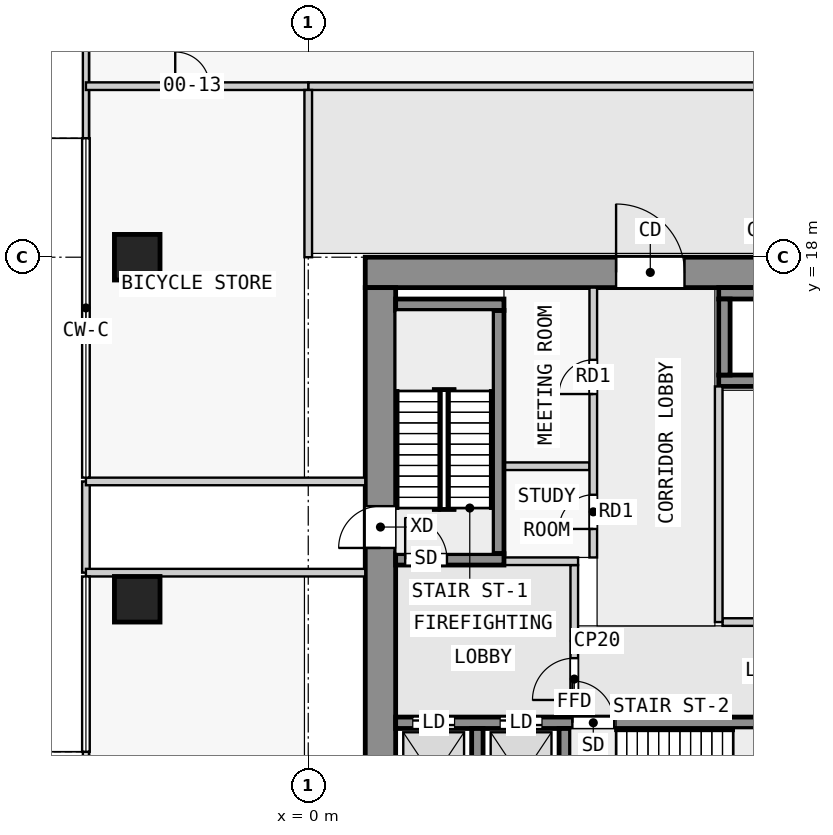
"""IFC4 building model, lengths in metres.
Left out: names, types, materials, properties, quantities, classifications, styles, units other than length and angle.
Written with IfcOpenShell. Run it as: python <this file> out.ifc"""

import sys

from ifc_helpers import new_model, si_unit, direction, frame, frame_2d, origin, origin_2d, place, context, subcontext, project, spatial, rectangle, extrude, element, fill, save


model = new_model("IFC4")
c1 = context("Model", 3, precision=1e-05, world=origin(), true_north=direction((0.0, 1.0)))
c2 = subcontext(c1, "Body", "Model", "MODEL_VIEW")
j1 = project(units=[si_unit("LENGTHUNIT", "METRE"), si_unit("PLANEANGLEUNIT", "RADIAN")], contexts=[c1])
p1 = place(None, origin())
s1 = spatial("IfcSite", under=j1, at=p1, CompositionType="ELEMENT")
p2 = place(p1, origin())
s2 = spatial("IfcBuilding", under=s1, at=p2, CompositionType="ELEMENT")
p3 = place(p2, origin())
s3 = spatial("IfcBuildingStorey", under=s2, at=p3, CompositionType="ELEMENT", Elevation=0.0)
for number, where, z_axis, x_axis in (
    (1, (-4.5, 9.0, 0.0), (0.0, 0.0, 1.0), (1.0, 0.0, 0.0)),
    (2, (-4.5, 18.0, 0.0), (0.0, 0.0, 1.0), (1.0, 0.0, 0.0)),
):
    element("IfcColumn", number, at=place(p3, frame(where, z_axis=z_axis, x_axis=x_axis)), inside=s3, PredefinedType="COLUMN", context=c2, shape_type="SweptSolid", body=[
        extrude(rectangle(XDim=1.2, YDim=1.2, at=origin_2d()), origin(), (0.0, 0.0, 1.0), 8.0),
    ])
p4 = place(p3, frame((1.5, 17.6, 0.0), z_axis=(0.0, 0.0, 1.0), x_axis=(1.0, 0.0, 0.0)))
e3 = element("IfcWall", 3, at=p4, inside=s3, PredefinedType="SHEAR", context=c2, shape_type="SweptSolid", body=[
    extrude(rectangle(XDim=21.0, YDim=0.8, at=frame_2d((10.5, 0.0))), origin(), (0.0, 0.0, 1.0), 7.65),
])
p5 = place(p4, frame((6.6, 0.0, 0.0)))
e4 = element("IfcOpeningElement", 4, at=p5, cuts=e3, PredefinedType="OPENING", context=c2, shape_type="SweptSolid", body=[
    extrude(rectangle(XDim=1.8, YDim=2.1, at=frame_2d((0.9, 1.05))), frame((0.0, 0.41, 0.0), z_axis=(0.0, -1.0, 0.0), x_axis=(1.0, 0.0, 0.0)), (0.0, 0.0, 1.0), 0.82),
])
p6 = place(p3, frame((1.9, 2.5, 0.0), z_axis=(0.0, 0.0, 1.0), x_axis=(0.0, 1.0, 0.0)))
e5 = element("IfcWall", 5, at=p6, inside=s3, PredefinedType="SHEAR", context=c2, shape_type="SweptSolid", body=[
    extrude(rectangle(XDim=14.7, YDim=0.8, at=frame_2d((7.35, 0.0))), origin(), (0.0, 0.0, 1.0), 7.65),
])
p7 = place(p6, frame((7.85, 0.0, 0.0)))
e6 = element("IfcOpeningElement", 6, at=p7, cuts=e5, PredefinedType="OPENING", context=c2, shape_type="SweptSolid", body=[
    extrude(rectangle(XDim=1.1, YDim=2.1, at=frame_2d((0.55, 1.05))), frame((0.0, 0.41, 0.0), z_axis=(0.0, -1.0, 0.0), x_axis=(1.0, 0.0, 0.0)), (0.0, 0.0, 1.0), 0.82),
])
for number, where, z_axis, x_axis in (
    (7, (4.45, 2.8, 0.0), (0.0, 0.0, 1.0), (0.0, 1.0, 0.0)),
    (8, (6.75, 2.8, 0.0), (0.0, 0.0, 1.0), (0.0, 1.0, 0.0)),
):
    element("IfcWall", number, at=place(p3, frame(where, z_axis=z_axis, x_axis=x_axis)), inside=s3, PredefinedType="SHEAR", context=c2, shape_type="SweptSolid", body=[
        extrude(rectangle(XDim=2.8, YDim=0.3, at=frame_2d((1.4, 0.0))), origin(), (0.0, 0.0, 1.0), 7.65),
    ])
p8 = place(p3, frame((2.3, 5.75, 0.0), z_axis=(0.0, 0.0, 1.0), x_axis=(1.0, 0.0, 0.0)))
e9 = element("IfcWall", 9, at=p8, inside=s3, PredefinedType="SHEAR", context=c2, shape_type="SweptSolid", body=[
    extrude(rectangle(XDim=18.8, YDim=0.3, at=frame_2d((9.4, 0.0))), origin(), (0.0, 0.0, 1.0), 7.65),
])
p9 = place(p8, frame((4.65, 0.0, 0.0)))
e10 = element("IfcOpeningElement", 10, at=p9, cuts=e9, PredefinedType="OPENING", context=c2, shape_type="SweptSolid", body=[
    extrude(rectangle(XDim=1.1, YDim=2.1, at=frame_2d((0.55, 1.05))), frame((0.0, 0.16, 0.0), z_axis=(0.0, -1.0, 0.0), x_axis=(1.0, 0.0, 0.0)), (0.0, 0.0, 1.0), 0.32),
])
p10 = place(p8, frame((0.45, 0.0, 0.0)))
e11 = element("IfcOpeningElement", 11, at=p10, cuts=e9, PredefinedType="OPENING", context=c2, shape_type="SweptSolid", body=[
    extrude(rectangle(XDim=1.1, YDim=2.1, at=frame_2d((0.55, 1.05))), frame((0.0, 0.16, 0.0), z_axis=(0.0, -1.0, 0.0), x_axis=(1.0, 0.0, 0.0)), (0.0, 0.0, 1.0), 0.32),
])
p11 = place(p8, frame((2.75, 0.0, 0.0)))
e12 = element("IfcOpeningElement", 12, at=p11, cuts=e9, PredefinedType="OPENING", context=c2, shape_type="SweptSolid", body=[
    extrude(rectangle(XDim=1.1, YDim=2.1, at=frame_2d((0.55, 1.05))), frame((0.0, 0.16, 0.0), z_axis=(0.0, -1.0, 0.0), x_axis=(1.0, 0.0, 0.0)), (0.0, 0.0, 1.0), 0.32),
])
p12 = place(p8, frame((11.85, 0.0, 0.0)))
e13 = element("IfcOpeningElement", 13, at=p12, cuts=e9, PredefinedType="OPENING", context=c2, shape_type="SweptSolid", body=[
    extrude(rectangle(XDim=1.1, YDim=2.1, at=frame_2d((0.55, 1.05))), frame((0.0, 0.16, 0.0), z_axis=(0.0, -1.0, 0.0), x_axis=(1.0, 0.0, 0.0)), (0.0, 0.0, 1.0), 0.32),
])
p13 = place(p8, frame((14.35, 0.0, 0.0)))
e14 = element("IfcOpeningElement", 14, at=p13, cuts=e9, PredefinedType="OPENING", context=c2, shape_type="SweptSolid", body=[
    extrude(rectangle(XDim=1.1, YDim=2.1, at=frame_2d((0.55, 1.05))), frame((0.0, 0.16, 0.0), z_axis=(0.0, -1.0, 0.0), x_axis=(1.0, 0.0, 0.0)), (0.0, 0.0, 1.0), 0.32),
])
p14 = place(p8, frame((16.85, 0.0, 0.0)))
e15 = element("IfcOpeningElement", 15, at=p14, cuts=e9, PredefinedType="OPENING", context=c2, shape_type="SweptSolid", body=[
    extrude(rectangle(XDim=1.1, YDim=2.1, at=frame_2d((0.55, 1.05))), frame((0.0, 0.16, 0.0), z_axis=(0.0, -1.0, 0.0), x_axis=(1.0, 0.0, 0.0)), (0.0, 0.0, 1.0), 0.32),
])
p15 = place(p3, frame((2.3, 10.05, 0.0), z_axis=(0.0, 0.0, 1.0), x_axis=(1.0, 0.0, 0.0)))
e16 = element("IfcWall", 16, at=p15, inside=s3, PredefinedType="SHEAR", context=c2, shape_type="SweptSolid", body=[
    extrude(rectangle(XDim=2.85, YDim=0.3, at=frame_2d((1.425, 0.0))), origin(), (0.0, 0.0, 1.0), 7.65),
])
p16 = place(p15, frame((0.25, 0.0, 0.0)))
e17 = element("IfcOpeningElement", 17, at=p16, cuts=e16, PredefinedType="OPENING", context=c2, shape_type="SweptSolid", body=[
    extrude(rectangle(XDim=1.1, YDim=2.1, at=frame_2d((0.55, 1.05))), frame((0.0, 0.16, 0.0), z_axis=(0.0, -1.0, 0.0), x_axis=(1.0, 0.0, 0.0)), (0.0, 0.0, 1.0), 0.32),
])
p17 = place(p3, frame((5.0, 10.2, 0.0), z_axis=(0.0, 0.0, 1.0), x_axis=(0.0, 1.0, 0.0)))
e18 = element("IfcWall", 18, at=p17, inside=s3, PredefinedType="SHEAR", context=c2, shape_type="SweptSolid", body=[
    extrude(rectangle(XDim=6.4, YDim=0.3, at=frame_2d((3.2, 0.0))), origin(), (0.0, 0.0, 1.0), 7.65),
])
p18 = place(p3, frame((2.3, 16.75, 0.0), z_axis=(0.0, 0.0, 1.0), x_axis=(1.0, 0.0, 0.0)))
e19 = element("IfcWall", 19, at=p18, inside=s3, PredefinedType="SHEAR", context=c2, shape_type="SweptSolid", body=[
    extrude(rectangle(XDim=2.85, YDim=0.3, at=frame_2d((1.425, 0.0))), origin(), (0.0, 0.0, 1.0), 7.65),
])
for number, where, z_axis, x_axis in (
    (20, (10.8, 17.05, 0.0), (0.0, 0.0, 1.0), (1.0, 0.0, 0.0)),
    (21, (10.8, 14.75, 0.0), (0.0, 0.0, 1.0), (1.0, 0.0, 0.0)),
):
    element("IfcWall", number, at=place(p3, frame(where, z_axis=z_axis, x_axis=x_axis)), inside=s3, PredefinedType="SHEAR", context=c2, shape_type="SweptSolid", body=[
        extrude(rectangle(XDim=7.8, YDim=0.3, at=frame_2d((3.9, 0.0))), origin(), (0.0, 0.0, 1.0), 7.65),
    ])
p19 = place(p3, frame((10.95, 14.9, 0.0), z_axis=(0.0, 0.0, 1.0), x_axis=(0.0, 1.0, 0.0)))
e22 = element("IfcWall", 22, at=p19, inside=s3, PredefinedType="SHEAR", context=c2, shape_type="SweptSolid", body=[
    extrude(rectangle(XDim=2.0, YDim=0.3, at=frame_2d((1.0, 0.0))), origin(), (0.0, 0.0, 1.0), 7.65),
])
p20 = place(p3, frame((-5.85, 21.13, 0.0), z_axis=(0.0, 0.0, 1.0), x_axis=(0.0, 1.0, 0.0)))
e23 = element("IfcWall", 23, at=p20, inside=s3, PredefinedType="STANDARD", context=c2, shape_type="SweptSolid", body=[
    extrude(rectangle(XDim=13.395, YDim=0.16, at=frame_2d((6.698, 0.0))), origin(), (0.0, 0.0, 1.0), 7.65),
])
p21 = place(p20, frame((6.948, 0.0, 0.0)))
e24 = element("IfcOpeningElement", 24, at=p21, cuts=e23, PredefinedType="OPENING", context=c2, shape_type="SweptSolid", body=[
    extrude(rectangle(XDim=3.0, YDim=3.0, at=frame_2d((1.5, 1.5))), frame((0.0, 0.09, 0.0), z_axis=(0.0, -1.0, 0.0), x_axis=(1.0, 0.0, 0.0)), (0.0, 0.0, 1.0), 0.18),
])
p22 = place(p20, frame((9.948, 0.0, 0.0)))
e25 = element("IfcOpeningElement", 25, at=p22, cuts=e23, PredefinedType="OPENING", context=c2, shape_type="SweptSolid", body=[
    extrude(rectangle(XDim=3.0, YDim=3.0, at=frame_2d((1.5, 1.5))), frame((0.0, 0.09, 0.0), z_axis=(0.0, -1.0, 0.0), x_axis=(1.0, 0.0, 0.0)), (0.0, 0.0, 1.0), 0.18),
])
p23 = place(p20, frame((3.67, 0.0, 0.0)))
e26 = element("IfcOpeningElement", 26, at=p23, cuts=e23, PredefinedType="OPENING", context=c2, shape_type="SweptSolid", body=[
    extrude(rectangle(XDim=1.2, YDim=2.4, at=frame_2d((0.6, 1.2))), frame((0.0, 0.09, 0.0), z_axis=(0.0, -1.0, 0.0), x_axis=(1.0, 0.0, 0.0)), (0.0, 0.0, 1.0), 0.18),
])
p24 = place(p3, frame((-5.85, 0.375, 0.0), z_axis=(0.0, 0.0, 1.0), x_axis=(0.0, 1.0, 0.0)))
e27 = element("IfcWall", 27, at=p24, inside=s3, PredefinedType="STANDARD", context=c2, shape_type="SweptSolid", body=[
    extrude(rectangle(XDim=4.613, YDim=0.16, at=frame_2d((2.306, 0.0))), origin(), (0.0, 0.0, 1.0), 7.65),
])
p25 = place(p24, frame((1.706, 0.0, 0.0)))
e28 = element("IfcOpeningElement", 28, at=p25, cuts=e27, PredefinedType="OPENING", context=c2, shape_type="SweptSolid", body=[
    extrude(rectangle(XDim=1.2, YDim=2.4, at=frame_2d((0.6, 1.2))), frame((0.0, 0.09, 0.0), z_axis=(0.0, -1.0, 0.0), x_axis=(1.0, 0.0, 0.0)), (0.0, 0.0, 1.0), 0.18),
])
p26 = place(p3, frame((7.0, 5.9, 0.0), z_axis=(0.0, 0.0, 1.0), x_axis=(0.0, 1.0, 0.0)))
e29 = element("IfcWall", 29, at=p26, inside=s3, PredefinedType="PARTITIONING", context=c2, shape_type="SweptSolid", body=[
    extrude(rectangle(XDim=4.0, YDim=0.2, at=frame_2d((2.0, 0.0))), origin(), (0.0, 0.0, 1.0), 7.65),
])
p27 = place(p26, frame((0.45, 0.0, 0.0)))
e30 = element("IfcOpeningElement", 30, at=p27, cuts=e29, PredefinedType="OPENING", context=c2, shape_type="SweptSolid", body=[
    extrude(rectangle(XDim=1.1, YDim=2.1, at=frame_2d((0.55, 1.05))), frame((0.0, 0.11, 0.0), z_axis=(0.0, -1.0, 0.0), x_axis=(1.0, 0.0, 0.0)), (0.0, 0.0, 1.0), 0.22),
])
p28 = place(p3, frame((5.15, 10.0, 0.0), z_axis=(0.0, 0.0, 1.0), x_axis=(1.0, 0.0, 0.0)))
e31 = element("IfcWall", 31, at=p28, inside=s3, PredefinedType="PARTITIONING", context=c2, shape_type="SweptSolid", body=[
    extrude(rectangle(XDim=1.95, YDim=0.2, at=frame_2d((0.975, 0.0))), origin(), (0.0, 0.0, 1.0), 7.65),
])
p29 = place(p3, frame((10.8, 8.4, 0.0), z_axis=(0.0, 0.0, 1.0), x_axis=(0.0, 1.0, 0.0)))
e32 = element("IfcWall", 32, at=p29, inside=s3, PredefinedType="PARTITIONING", context=c2, shape_type="SweptSolid", body=[
    extrude(rectangle(XDim=6.2, YDim=0.2, at=frame_2d((3.1, 0.0))), origin(), (0.0, 0.0, 1.0), 7.65),
])
p30 = place(p3, frame((10.9, 8.4, 0.0), z_axis=(0.0, 0.0, 1.0), x_axis=(1.0, 0.0, 0.0)))
e33 = element("IfcWall", 33, at=p30, inside=s3, PredefinedType="PARTITIONING", context=c2, shape_type="SweptSolid", body=[
    extrude(rectangle(XDim=7.4, YDim=0.2, at=frame_2d((3.7, 0.0))), origin(), (0.0, 0.0, 1.0), 7.65),
])
p31 = place(p3, frame((7.5, 10.1, 0.0), z_axis=(0.0, 0.0, 1.0), x_axis=(0.0, 1.0, 0.0)))
e34 = element("IfcWall", 34, at=p31, inside=s3, PredefinedType="PARTITIONING", context=c2, shape_type="SweptSolid", body=[
    extrude(rectangle(XDim=7.1, YDim=0.2, at=frame_2d((3.55, 0.0))), origin(), (0.0, 0.0, 1.0), 7.65),
])
p32 = place(p31, frame((0.75, 0.0, 0.0)))
e35 = element("IfcOpeningElement", 35, at=p32, cuts=e34, PredefinedType="OPENING", context=c2, shape_type="SweptSolid", body=[
    extrude(rectangle(XDim=0.9, YDim=2.1, at=frame_2d((0.45, 1.05))), frame((0.0, 0.11, 0.0), z_axis=(0.0, -1.0, 0.0), x_axis=(1.0, 0.0, 0.0)), (0.0, 0.0, 1.0), 0.22),
])
p33 = place(p31, frame((4.3, 0.0, 0.0)))
e36 = element("IfcOpeningElement", 36, at=p33, cuts=e34, PredefinedType="OPENING", context=c2, shape_type="SweptSolid", body=[
    extrude(rectangle(XDim=0.9, YDim=2.1, at=frame_2d((0.45, 1.05))), frame((0.0, 0.11, 0.0), z_axis=(0.0, -1.0, 0.0), x_axis=(1.0, 0.0, 0.0)), (0.0, 0.0, 1.0), 0.22),
])
p34 = place(p3, frame((5.15, 12.5, 0.0), z_axis=(0.0, 0.0, 1.0), x_axis=(1.0, 0.0, 0.0)))
e37 = element("IfcWall", 37, at=p34, inside=s3, PredefinedType="PARTITIONING", context=c2, shape_type="SweptSolid", body=[
    extrude(rectangle(XDim=2.25, YDim=0.2, at=frame_2d((1.125, 0.0))), origin(), (0.0, 0.0, 1.0), 7.65),
])
for number, where, z_axis, x_axis in (
    (38, (-5.85, 9.7, 0.0), (0.0, 0.0, 1.0), (1.0, 0.0, 0.0)),
    (39, (-5.85, 12.1, 0.0), (0.0, 0.0, 1.0), (1.0, 0.0, 0.0)),
):
    element("IfcWall", number, at=place(p3, frame(where, z_axis=z_axis, x_axis=x_axis)), inside=s3, PredefinedType="PARTITIONING", context=c2, shape_type="SweptSolid", body=[
        extrude(rectangle(XDim=7.35, YDim=0.2, at=frame_2d((3.675, 0.0))), origin(), (0.0, 0.0, 1.0), 7.65),
    ])
p35 = place(p3, frame((-5.85, 9.7, 0.0), z_axis=(0.0, 0.0, 1.0), x_axis=(0.0, 1.0, 0.0)))
e40 = element("IfcWall", 40, at=p35, inside=s3, PredefinedType="PARTITIONING", context=c2, shape_type="SweptSolid", body=[
    extrude(rectangle(XDim=2.4, YDim=0.2, at=frame_2d((1.2, 0.0))), origin(), (0.0, 0.0, 1.0), 7.65),
])
p36 = place(p3, frame((45.0, 22.5, 0.0), z_axis=(0.0, 0.0, 1.0), x_axis=(-1.0, 0.0, 0.0)))
e41 = element("IfcWall", 41, at=p36, inside=s3, PredefinedType="PARTITIONING", context=c2, shape_type="SweptSolid", body=[
    extrude(rectangle(XDim=45.0, YDim=0.2, at=frame_2d((22.5, 0.0))), origin(), (0.0, 0.0, 1.0), 6.95),
])
p37 = place(p36, frame((21.6, 0.0, 0.0)))
e42 = element("IfcOpeningElement", 42, at=p37, cuts=e41, PredefinedType="OPENING", context=c2, shape_type="SweptSolid", body=[
    extrude(rectangle(XDim=1.8, YDim=2.1, at=frame_2d((0.9, 1.05))), frame((0.0, 0.11, 0.0), z_axis=(0.0, -1.0, 0.0), x_axis=(1.0, 0.0, 0.0)), (0.0, 0.0, 1.0), 0.22),
])
p38 = place(p3, frame((-5.85, 22.5, 0.0), z_axis=(0.0, 0.0, 1.0), x_axis=(1.0, 0.0, 0.0)))
e43 = element("IfcWall", 43, at=p38, inside=s3, PredefinedType="PARTITIONING", context=c2, shape_type="SweptSolid", body=[
    extrude(rectangle(XDim=5.85, YDim=0.2, at=frame_2d((2.925, 0.0))), origin(), (0.0, 0.0, 1.0), 6.95),
])
p39 = place(p38, frame((2.35, 0.0, 0.0)))
e44 = element("IfcOpeningElement", 44, at=p39, cuts=e43, PredefinedType="OPENING", context=c2, shape_type="SweptSolid", body=[
    extrude(rectangle(XDim=0.9, YDim=2.1, at=frame_2d((0.45, 1.05))), frame((0.0, 0.11, 0.0), z_axis=(0.0, -1.0, 0.0), x_axis=(1.0, 0.0, 0.0)), (0.0, 0.0, 1.0), 0.22),
])
p40 = place(p3, frame((0.0, 22.4, 0.0), z_axis=(0.0, 0.0, 1.0), x_axis=(0.0, -1.0, 0.0)))
e45 = element("IfcWall", 45, at=p40, inside=s3, PredefinedType="PARTITIONING", context=c2, shape_type="SweptSolid", body=[
    extrude(rectangle(XDim=4.4, YDim=0.2, at=frame_2d((2.2, 0.0))), origin(), (0.0, 0.0, 1.0), 7.65),
])
p41 = place(p27, origin())
e46 = element("IfcDoor", 46, at=p41, inside=s3, OperationType="SINGLE_SWING_LEFT", PredefinedType="DOOR", context=c2, shape_type="SweptSolid", body=[
    extrude(rectangle(XDim=1.1, YDim=2.1, at=frame_2d((0.55, 1.05))), frame((0.0, 0.025, 0.0), z_axis=(0.0, -1.0, 0.0), x_axis=(1.0, 0.0, 0.0)), (0.0, 0.0, 1.0), 0.05),
])
fill(e30, e46)
p42 = place(p16, origin())
e47 = element("IfcDoor", 47, at=p42, inside=s3, OperationType="SINGLE_SWING_RIGHT", PredefinedType="DOOR", context=c2, shape_type="SweptSolid", body=[
    extrude(rectangle(XDim=1.1, YDim=2.1, at=frame_2d((0.55, 1.05))), frame((0.0, 0.025, 0.0), z_axis=(0.0, -1.0, 0.0), x_axis=(1.0, 0.0, 0.0)), (0.0, 0.0, 1.0), 0.05),
])
fill(e17, e47)
p43 = place(p9, origin())
e48 = element("IfcDoor", 48, at=p43, inside=s3, OperationType="SINGLE_SWING_LEFT", PredefinedType="DOOR", context=c2, shape_type="SweptSolid", body=[
    extrude(rectangle(XDim=1.1, YDim=2.1, at=frame_2d((0.55, 1.05))), frame((0.0, 0.025, 0.0), z_axis=(0.0, -1.0, 0.0), x_axis=(1.0, 0.0, 0.0)), (0.0, 0.0, 1.0), 0.05),
])
fill(e10, e48)
p44 = place(p10, origin())
e49 = element("IfcDoor", 49, at=p44, inside=s3, OperationType="DOUBLE_DOOR_SLIDING", PredefinedType="DOOR", context=c2, shape_type="SweptSolid", body=[
    extrude(rectangle(XDim=1.1, YDim=2.1, at=frame_2d((0.55, 1.05))), frame((0.0, 0.025, 0.0), z_axis=(0.0, -1.0, 0.0), x_axis=(1.0, 0.0, 0.0)), (0.0, 0.0, 1.0), 0.05),
])
fill(e11, e49)
p45 = place(p11, origin())
e50 = element("IfcDoor", 50, at=p45, inside=s3, OperationType="DOUBLE_DOOR_SLIDING", PredefinedType="DOOR", context=c2, shape_type="SweptSolid", body=[
    extrude(rectangle(XDim=1.1, YDim=2.1, at=frame_2d((0.55, 1.05))), frame((0.0, 0.025, 0.0), z_axis=(0.0, -1.0, 0.0), x_axis=(1.0, 0.0, 0.0)), (0.0, 0.0, 1.0), 0.05),
])
fill(e12, e50)
p46 = place(p5, origin())
e51 = element("IfcDoor", 51, at=p46, inside=s3, OperationType="DOUBLE_DOOR_SINGLE_SWING", PredefinedType="DOOR", context=c2, shape_type="SweptSolid", body=[
    extrude(rectangle(XDim=1.8, YDim=2.1, at=frame_2d((0.9, 1.05))), frame((0.0, 0.025, 0.0), z_axis=(0.0, -1.0, 0.0), x_axis=(1.0, 0.0, 0.0)), (0.0, 0.0, 1.0), 0.05),
])
fill(e4, e51)
p47 = place(p32, origin())
e52 = element("IfcDoor", 52, at=p47, inside=s3, OperationType="SINGLE_SWING_RIGHT", PredefinedType="DOOR", context=c2, shape_type="SweptSolid", body=[
    extrude(rectangle(XDim=0.9, YDim=2.1, at=frame_2d((0.45, 1.05))), frame((0.0, 0.025, 0.0), z_axis=(0.0, -1.0, 0.0), x_axis=(1.0, 0.0, 0.0)), (0.0, 0.0, 1.0), 0.05),
])
fill(e35, e52)
p48 = place(p33, origin())
e53 = element("IfcDoor", 53, at=p48, inside=s3, OperationType="SINGLE_SWING_RIGHT", PredefinedType="DOOR", context=c2, shape_type="SweptSolid", body=[
    extrude(rectangle(XDim=0.9, YDim=2.1, at=frame_2d((0.45, 1.05))), frame((0.0, 0.025, 0.0), z_axis=(0.0, -1.0, 0.0), x_axis=(1.0, 0.0, 0.0)), (0.0, 0.0, 1.0), 0.05),
])
fill(e36, e53)
p49 = place(p7, origin())
e54 = element("IfcDoor", 54, at=p49, inside=s3, OperationType="SINGLE_SWING_LEFT", PredefinedType="DOOR", context=c2, shape_type="SweptSolid", body=[
    extrude(rectangle(XDim=1.1, YDim=2.1, at=frame_2d((0.55, 1.05))), frame((0.0, 0.025, 0.0), z_axis=(0.0, -1.0, 0.0), x_axis=(1.0, 0.0, 0.0)), (0.0, 0.0, 1.0), 0.05),
])
fill(e6, e54)
p50 = place(p39, origin())
e55 = element("IfcDoor", 55, at=p50, inside=s3, OperationType="SINGLE_SWING_LEFT", PredefinedType="DOOR", context=c2, shape_type="SweptSolid", body=[
    extrude(rectangle(XDim=0.9, YDim=2.1, at=frame_2d((0.45, 1.05))), frame((0.0, 0.025, 0.0), z_axis=(0.0, -1.0, 0.0), x_axis=(1.0, 0.0, 0.0)), (0.0, 0.0, 1.0), 0.05),
])
fill(e44, e55)
save(model, sys.argv[1])
